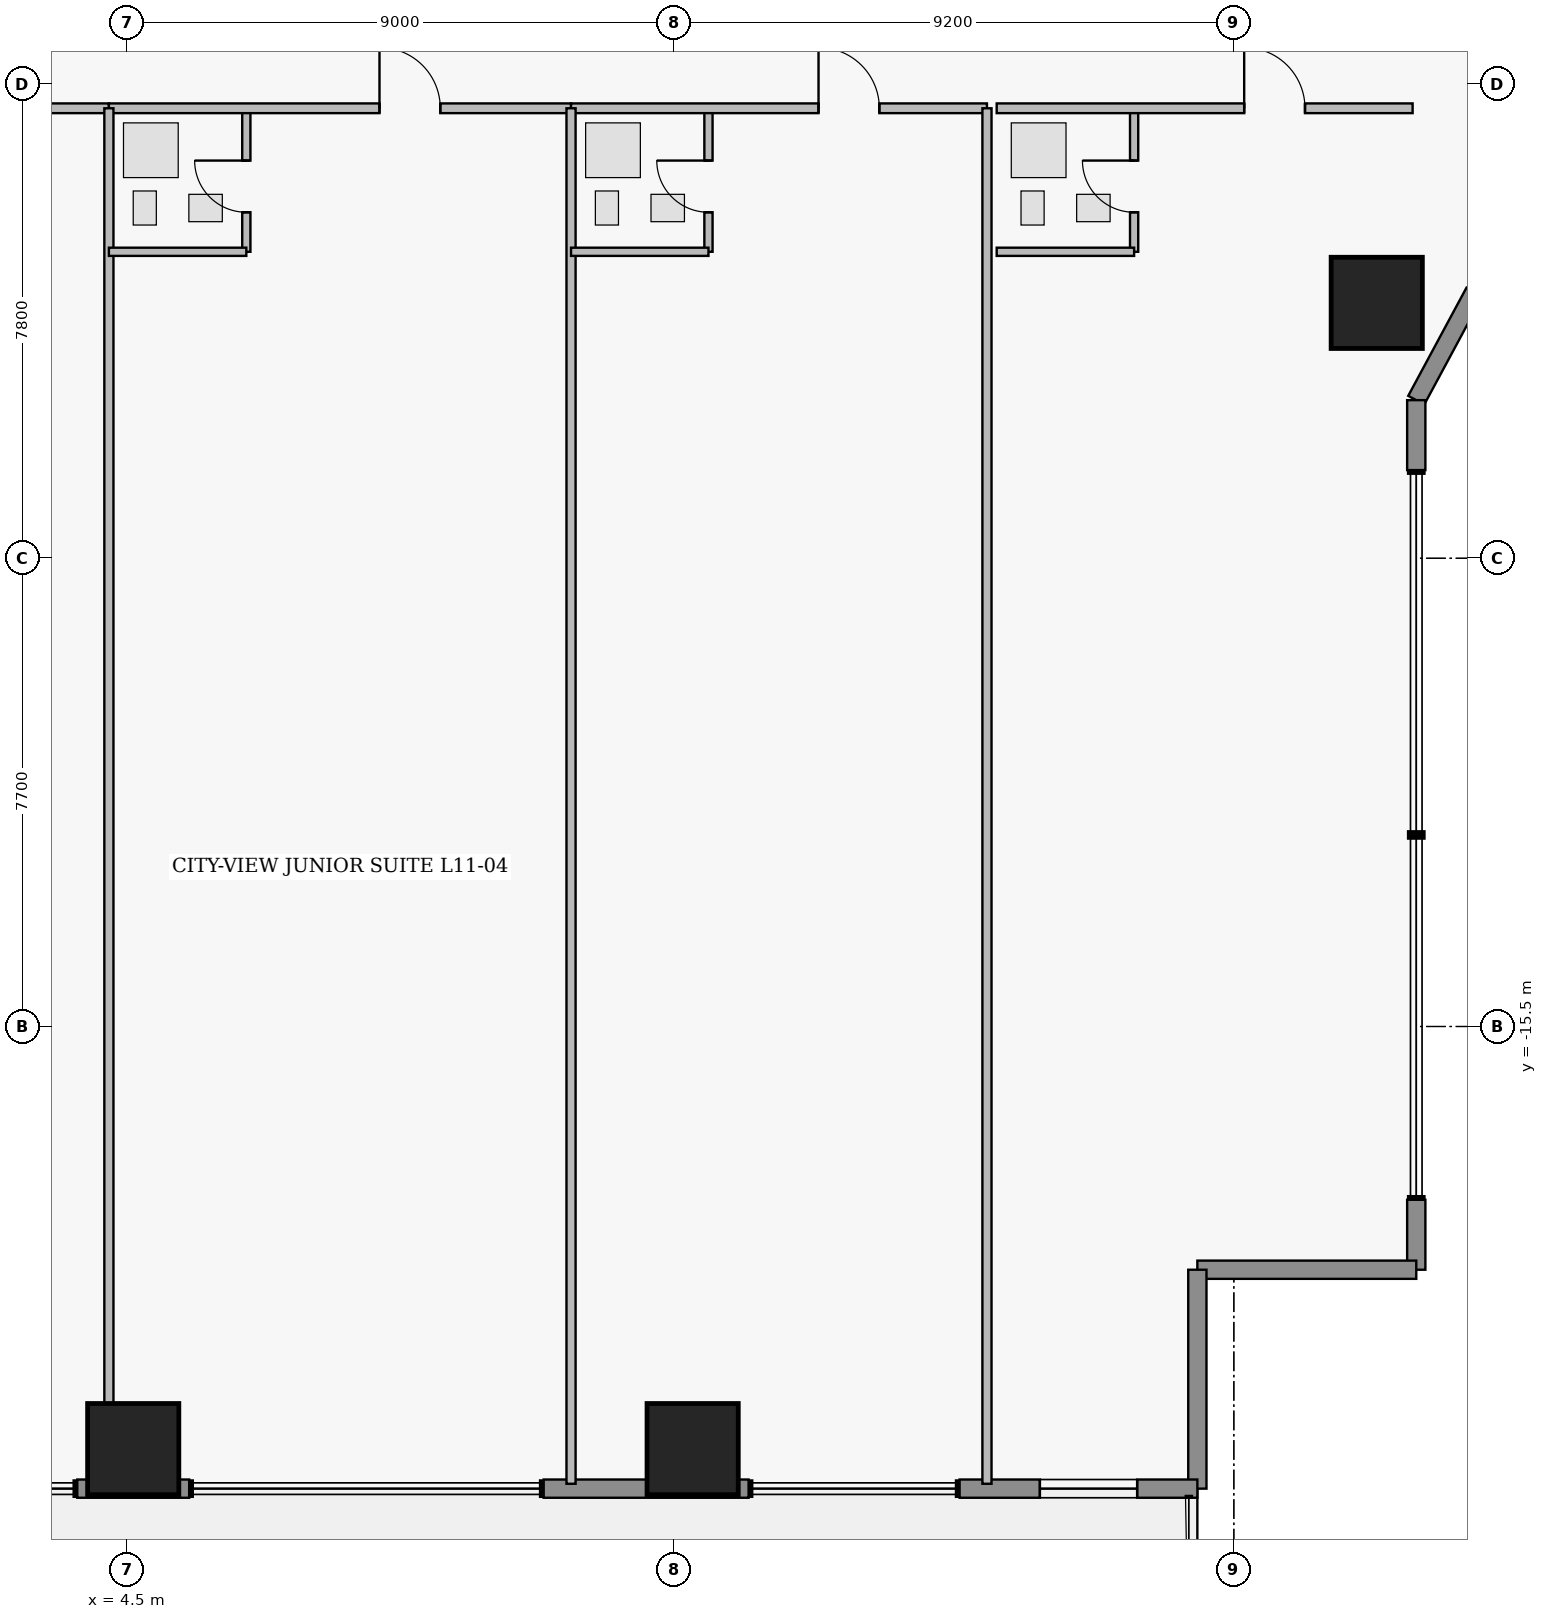
"""IFC4 building model, lengths in metres.
Left out: names, types, materials, properties, quantities, classifications, styles, units other than length and angle.
Written with IfcOpenShell. Run it as: python <this file> out.ifc"""

import sys

from ifc_helpers import new_model, si_unit, direction, frame, frame_2d, origin, origin_2d, place, context, subcontext, project, spatial, rectangle, extrude, element, fill, save


model = new_model("IFC4")
c1 = context("Model", 3, precision=1e-05, world=origin(), true_north=direction((0.0, 1.0)))
c2 = subcontext(c1, "Body", "Model", "MODEL_VIEW")
j1 = project(units=[si_unit("LENGTHUNIT", "METRE"), si_unit("PLANEANGLEUNIT", "RADIAN")], contexts=[c1])
p1 = place(None, origin())
s1 = spatial("IfcSite", under=j1, at=p1, CompositionType="ELEMENT")
p2 = place(p1, origin())
s2 = spatial("IfcBuilding", under=s1, at=p2, CompositionType="ELEMENT")
p3 = place(p2, frame((0.0, 0.0, 49.5)))
s3 = spatial("IfcBuildingStorey", under=s2, at=p3, CompositionType="ELEMENT", Elevation=49.5)
for number, where, z_axis, x_axis in (
    (1, (4.6, -22.45, 0.0), (0.0, 0.0, 1.0), (1.0, 0.0, 0.0)),
    (2, (13.8, -22.45, 0.0), (0.0, 0.0, 1.0), (1.0, 0.0, 0.0)),
    (3, (25.05, -3.6, 0.0), (0.0, 0.0, 1.0), (1.0, 0.0, 0.0)),
):
    element("IfcColumn", number, at=place(p3, frame(where, z_axis=z_axis, x_axis=x_axis)), inside=s3, PredefinedType="COLUMN", context=c2, shape_type="SweptSolid", body=[
        extrude(rectangle(XDim=1.5, YDim=1.5, at=origin_2d()), origin(), (0.0, 0.0, 1.0), 3.65),
    ])
p4 = place(p3, frame((25.7, 5.2, 0.0), z_axis=(0.0, 0.0, 1.0), x_axis=(0.474109683532, -0.880465790352, 0.0)))
e4 = element("IfcWall", 4, at=p4, inside=s3, PredefinedType="STANDARD", context=c2, shape_type="SweptSolid", body=[
    extrude(rectangle(XDim=5.906, YDim=0.3, at=frame_2d((2.953, 0.0))), origin(), (0.0, 0.0, 1.0), 3.43),
])
p5 = place(p4, frame((2.324, 0.0, 0.95)))
e5 = element("IfcOpeningElement", 5, at=p5, cuts=e4, PredefinedType="OPENING", context=c2, shape_type="SweptSolid", body=[
    extrude(rectangle(XDim=1.15, YDim=1.55, at=frame_2d((0.575, 0.775))), frame((0.0, 0.16, 0.0), z_axis=(0.0, -1.0, 0.0), x_axis=(1.0, 0.0, 0.0)), (0.0, 0.0, 1.0), 0.32),
])
p6 = place(p3, frame((26.658, -3.421, 0.0), z_axis=(0.0, 0.0, 1.0), x_axis=(-0.474121438562, -0.88045946045, 0.0)))
e6 = element("IfcWall", 6, at=p6, inside=s3, PredefinedType="STANDARD", context=c2, shape_type="SweptSolid", body=[
    extrude(rectangle(XDim=2.021, YDim=0.3, at=frame_2d((1.01, 0.0))), origin(), (0.0, 0.0, 1.0), 3.43),
])
p7 = place(p3, frame((25.7, -5.2, 0.0), z_axis=(0.0, 0.0, 1.0), x_axis=(0.0, -1.0, 0.0)))
e7 = element("IfcWall", 7, at=p7, inside=s3, PredefinedType="STANDARD", context=c2, shape_type="SweptSolid", body=[
    extrude(rectangle(XDim=1.15, YDim=0.3, at=frame_2d((0.575, 0.0))), origin(), (0.0, 0.0, 1.0), 3.43),
])
p8 = place(p3, frame((25.7, -18.35, 0.0), z_axis=(0.0, 0.0, 1.0), x_axis=(0.0, -1.0, 0.0)))
e8 = element("IfcWall", 8, at=p8, inside=s3, PredefinedType="STANDARD", context=c2, shape_type="SweptSolid", body=[
    extrude(rectangle(XDim=1.15, YDim=0.3, at=frame_2d((0.575, 0.0))), origin(), (0.0, 0.0, 1.0), 3.43),
])
p9 = place(p3, frame((25.7, -19.5, 0.0), z_axis=(0.0, 0.0, 1.0), x_axis=(-1.0, 0.0, 0.0)))
e9 = element("IfcWall", 9, at=p9, inside=s3, PredefinedType="STANDARD", context=c2, shape_type="SweptSolid", body=[
    extrude(rectangle(XDim=3.6, YDim=0.3, at=frame_2d((1.8, 0.0))), origin(), (0.0, 0.0, 1.0), 3.43),
])
p10 = place(p3, frame((22.1, -19.5, 0.0), z_axis=(0.0, 0.0, 1.0), x_axis=(0.0, -1.0, 0.0)))
e10 = element("IfcWall", 10, at=p10, inside=s3, PredefinedType="STANDARD", context=c2, shape_type="SweptSolid", body=[
    extrude(rectangle(XDim=3.6, YDim=0.3, at=frame_2d((1.8, 0.0))), origin(), (0.0, 0.0, 1.0), 3.43),
])
p11 = place(p3, frame((22.1, -23.1, 0.0), z_axis=(0.0, 0.0, 1.0), x_axis=(-1.0, 0.0, 0.0)))
e11 = element("IfcWall", 11, at=p11, inside=s3, PredefinedType="STANDARD", context=c2, shape_type="SweptSolid", body=[
    extrude(rectangle(XDim=3.91, YDim=0.3, at=frame_2d((1.955, 0.0))), origin(), (0.0, 0.0, 1.0), 3.43),
])
p12 = place(p11, frame((0.99, 0.0, 0.85)))
e12 = element("IfcOpeningElement", 12, at=p12, cuts=e11, PredefinedType="OPENING", context=c2, shape_type="SweptSolid", body=[
    extrude(rectangle(XDim=1.6, YDim=1.8, at=frame_2d((0.8, 0.9))), frame((0.0, 0.16, 0.0), z_axis=(0.0, -1.0, 0.0), x_axis=(1.0, 0.0, 0.0)), (0.0, 0.0, 1.0), 0.32),
])
p13 = place(p3, frame((14.72, -23.1, 0.0), z_axis=(0.0, 0.0, 1.0), x_axis=(-1.0, 0.0, 0.0)))
e13 = element("IfcWall", 13, at=p13, inside=s3, PredefinedType="STANDARD", context=c2, shape_type="SweptSolid", body=[
    extrude(rectangle(XDim=3.37, YDim=0.3, at=frame_2d((1.685, 0.0))), origin(), (0.0, 0.0, 1.0), 3.43),
])
p14 = place(p3, frame((5.52, -23.1, 0.0), z_axis=(0.0, 0.0, 1.0), x_axis=(-1.0, 0.0, 0.0)))
e14 = element("IfcWall", 14, at=p14, inside=s3, PredefinedType="STANDARD", context=c2, shape_type="SweptSolid", body=[
    extrude(rectangle(XDim=1.84, YDim=0.3, at=frame_2d((0.92, 0.0))), origin(), (0.0, 0.0, 1.0), 3.43),
])
p15 = place(p3, frame((-3.6, -0.4, 0.0), z_axis=(0.0, 0.0, 1.0), x_axis=(1.0, 0.0, 0.0)))
e15 = element("IfcWall", 15, at=p15, inside=s3, PredefinedType="PARTITIONING", context=c2, shape_type="SweptSolid", body=[
    extrude(rectangle(XDim=7.8, YDim=0.16, at=frame_2d((3.9, 0.0))), origin(), (0.0, 0.0, 1.0), 3.43),
])
p16 = place(p15, frame((4.55, 0.0, 0.0)))
e16 = element("IfcOpeningElement", 16, at=p16, cuts=e15, PredefinedType="OPENING", context=c2, shape_type="SweptSolid", body=[
    extrude(rectangle(XDim=1.0, YDim=2.15, at=frame_2d((0.5, 1.075))), frame((0.0, 0.09, 0.0), z_axis=(0.0, -1.0, 0.0), x_axis=(1.0, 0.0, 0.0)), (0.0, 0.0, 1.0), 0.18),
])
p17 = place(p3, frame((6.46, -2.76, 0.0), z_axis=(0.0, 0.0, 1.0), x_axis=(0.0, 1.0, 0.0)))
e17 = element("IfcWall", 17, at=p17, inside=s3, PredefinedType="PLUMBINGWALL", context=c2, shape_type="SweptSolid", body=[
    extrude(rectangle(XDim=2.36, YDim=0.135, at=frame_2d((1.18, 0.0))), origin(), (0.0, 0.0, 1.0), 3.43),
])
p18 = place(p17, frame((0.65, 0.0, 0.0)))
e18 = element("IfcOpeningElement", 18, at=p18, cuts=e17, PredefinedType="OPENING", context=c2, shape_type="SweptSolid", body=[
    extrude(rectangle(XDim=0.85, YDim=2.1, at=frame_2d((0.425, 1.05))), frame((0.0, 0.077, 0.0), z_axis=(0.0, -1.0, 0.0), x_axis=(1.0, 0.0, 0.0)), (0.0, 0.0, 1.0), 0.155),
])
p19 = place(p3, frame((4.2, -0.4, 0.0), z_axis=(0.0, 0.0, 1.0), x_axis=(1.0, 0.0, 0.0)))
e19 = element("IfcWall", 19, at=p19, inside=s3, PredefinedType="PARTITIONING", context=c2, shape_type="SweptSolid", body=[
    extrude(rectangle(XDim=7.6, YDim=0.16, at=frame_2d((3.8, 0.0))), origin(), (0.0, 0.0, 1.0), 3.43),
])
p20 = place(p19, frame((4.45, 0.0, 0.0)))
e20 = element("IfcOpeningElement", 20, at=p20, cuts=e19, PredefinedType="OPENING", context=c2, shape_type="SweptSolid", body=[
    extrude(rectangle(XDim=1.0, YDim=2.15, at=frame_2d((0.5, 1.075))), frame((0.0, 0.09, 0.0), z_axis=(0.0, -1.0, 0.0), x_axis=(1.0, 0.0, 0.0)), (0.0, 0.0, 1.0), 0.18),
])
p21 = place(p3, frame((14.06, -2.76, 0.0), z_axis=(0.0, 0.0, 1.0), x_axis=(0.0, 1.0, 0.0)))
e21 = element("IfcWall", 21, at=p21, inside=s3, PredefinedType="PLUMBINGWALL", context=c2, shape_type="SweptSolid", body=[
    extrude(rectangle(XDim=2.36, YDim=0.135, at=frame_2d((1.18, 0.0))), origin(), (0.0, 0.0, 1.0), 2.668),
])
p22 = place(p21, frame((0.65, 0.0, 0.0)))
e22 = element("IfcOpeningElement", 22, at=p22, cuts=e21, PredefinedType="OPENING", context=c2, shape_type="SweptSolid", body=[
    extrude(rectangle(XDim=0.85, YDim=2.1, at=frame_2d((0.425, 1.05))), frame((0.0, 0.077, 0.0), z_axis=(0.0, -1.0, 0.0), x_axis=(1.0, 0.0, 0.0)), (0.0, 0.0, 1.0), 0.155),
])
p23 = place(p3, frame((11.8, -0.4, 0.0), z_axis=(0.0, 0.0, 1.0), x_axis=(1.0, 0.0, 0.0)))
e23 = element("IfcWall", 23, at=p23, inside=s3, PredefinedType="PARTITIONING", context=c2, shape_type="SweptSolid", body=[
    extrude(rectangle(XDim=6.84, YDim=0.16, at=frame_2d((3.42, 0.0))), origin(), (0.0, 0.0, 1.0), 3.43),
])
p24 = place(p23, frame((4.07, 0.0, 0.0)))
e24 = element("IfcOpeningElement", 24, at=p24, cuts=e23, PredefinedType="OPENING", context=c2, shape_type="SweptSolid", body=[
    extrude(rectangle(XDim=1.0, YDim=2.15, at=frame_2d((0.5, 1.075))), frame((0.0, 0.09, 0.0), z_axis=(0.0, -1.0, 0.0), x_axis=(1.0, 0.0, 0.0)), (0.0, 0.0, 1.0), 0.18),
])
p25 = place(p3, frame((21.06, -2.76, 0.0), z_axis=(0.0, 0.0, 1.0), x_axis=(0.0, 1.0, 0.0)))
e25 = element("IfcWall", 25, at=p25, inside=s3, PredefinedType="PLUMBINGWALL", context=c2, shape_type="SweptSolid", body=[
    extrude(rectangle(XDim=2.36, YDim=0.135, at=frame_2d((1.18, 0.0))), origin(), (0.0, 0.0, 1.0), 3.43),
])
p26 = place(p25, frame((0.65, 0.0, 0.0)))
e26 = element("IfcOpeningElement", 26, at=p26, cuts=e25, PredefinedType="OPENING", context=c2, shape_type="SweptSolid", body=[
    extrude(rectangle(XDim=0.85, YDim=2.1, at=frame_2d((0.425, 1.05))), frame((0.0, 0.077, 0.0), z_axis=(0.0, -1.0, 0.0), x_axis=(1.0, 0.0, 0.0)), (0.0, 0.0, 1.0), 0.155),
])
p27 = place(p3, frame((18.8, -0.4, 0.0), z_axis=(0.0, 0.0, 1.0), x_axis=(1.0, 0.0, 0.0)))
e27 = element("IfcWall", 27, at=p27, inside=s3, PredefinedType="PARTITIONING", context=c2, shape_type="SweptSolid", body=[
    extrude(rectangle(XDim=6.84, YDim=0.16, at=frame_2d((3.42, 0.0))), origin(), (0.0, 0.0, 1.0), 3.43),
])
p28 = place(p27, frame((4.07, 0.0, 0.0)))
e28 = element("IfcOpeningElement", 28, at=p28, cuts=e27, PredefinedType="OPENING", context=c2, shape_type="SweptSolid", body=[
    extrude(rectangle(XDim=1.0, YDim=2.15, at=frame_2d((0.5, 1.075))), frame((0.0, 0.09, 0.0), z_axis=(0.0, -1.0, 0.0), x_axis=(1.0, 0.0, 0.0)), (0.0, 0.0, 1.0), 0.18),
])
p29 = place(p3, frame((4.2, -23.02, 0.0), z_axis=(0.0, 0.0, 1.0), x_axis=(0.0, 1.0, 0.0)))
e29 = element("IfcWall", 29, at=p29, inside=s3, PredefinedType="PARTITIONING", context=c2, shape_type="SweptSolid", body=[
    extrude(rectangle(XDim=22.62, YDim=0.15, at=frame_2d((11.31, 0.0))), origin(), (0.0, 0.0, 1.0), 2.668),
])
p30 = place(p3, frame((4.2, -2.76, 0.0), z_axis=(0.0, 0.0, 1.0), x_axis=(1.0, 0.0, 0.0)))
e30 = element("IfcWall", 30, at=p30, inside=s3, PredefinedType="PLUMBINGWALL", context=c2, shape_type="SweptSolid", body=[
    extrude(rectangle(XDim=2.26, YDim=0.135, at=frame_2d((1.13, 0.0))), origin(), (0.0, 0.0, 1.0), 3.43),
])
p31 = place(p3, frame((11.8, -23.02, 0.0), z_axis=(0.0, 0.0, 1.0), x_axis=(0.0, 1.0, 0.0)))
e31 = element("IfcWall", 31, at=p31, inside=s3, PredefinedType="PARTITIONING", context=c2, shape_type="SweptSolid", body=[
    extrude(rectangle(XDim=22.62, YDim=0.15, at=frame_2d((11.31, 0.0))), origin(), (0.0, 0.0, 1.0), 3.43),
])
p32 = place(p3, frame((11.8, -2.76, 0.0), z_axis=(0.0, 0.0, 1.0), x_axis=(1.0, 0.0, 0.0)))
e32 = element("IfcWall", 32, at=p32, inside=s3, PredefinedType="PLUMBINGWALL", context=c2, shape_type="SweptSolid", body=[
    extrude(rectangle(XDim=2.26, YDim=0.135, at=frame_2d((1.13, 0.0))), origin(), (0.0, 0.0, 1.0), 3.43),
])
p33 = place(p3, frame((18.64, -23.02, 0.0), z_axis=(0.0, 0.0, 1.0), x_axis=(0.0, 1.0, 0.0)))
e33 = element("IfcWall", 33, at=p33, inside=s3, PredefinedType="PARTITIONING", context=c2, shape_type="SweptSolid", body=[
    extrude(rectangle(XDim=22.62, YDim=0.15, at=frame_2d((11.31, 0.0))), origin(), (0.0, 0.0, 1.0), 3.43),
])
p34 = place(p3, frame((18.8, -2.76, 0.0), z_axis=(0.0, 0.0, 1.0), x_axis=(1.0, 0.0, 0.0)))
e34 = element("IfcWall", 34, at=p34, inside=s3, PredefinedType="PLUMBINGWALL", context=c2, shape_type="SweptSolid", body=[
    extrude(rectangle(XDim=2.26, YDim=0.135, at=frame_2d((1.13, 0.0))), origin(), (0.0, 0.0, 1.0), 3.43),
])
p35 = place(p12, origin())
e35 = element("IfcWindow", 35, at=p35, inside=s3, PartitioningType="SINGLE_PANEL", PredefinedType="WINDOW", context=c2, shape_type="SweptSolid", body=[
    extrude(rectangle(XDim=1.6, YDim=1.8, at=frame_2d((0.8, 0.9))), frame((0.0, 0.03, 0.0), z_axis=(0.0, -1.0, 0.0), x_axis=(1.0, 0.0, 0.0)), (0.0, 0.0, 1.0), 0.06),
])
fill(e12, e35)
p36 = place(p18, origin())
e36 = element("IfcDoor", 36, at=p36, inside=s3, OperationType="SINGLE_SWING_RIGHT", PredefinedType="DOOR", context=c2, shape_type="SweptSolid", body=[
    extrude(rectangle(XDim=0.85, YDim=2.1, at=frame_2d((0.425, 1.05))), frame((0.0, 0.025, 0.0), z_axis=(0.0, -1.0, 0.0), x_axis=(1.0, 0.0, 0.0)), (0.0, 0.0, 1.0), 0.05),
])
fill(e18, e36)
p37 = place(p20, origin())
e37 = element("IfcDoor", 37, at=p37, inside=s3, OperationType="SINGLE_SWING_LEFT", PredefinedType="DOOR", context=c2, shape_type="SweptSolid", body=[
    extrude(rectangle(XDim=1.0, YDim=2.15, at=frame_2d((0.5, 1.075))), frame((0.0, 0.025, 0.0), z_axis=(0.0, -1.0, 0.0), x_axis=(1.0, 0.0, 0.0)), (0.0, 0.0, 1.0), 0.05),
])
fill(e20, e37)
p38 = place(p22, origin())
e38 = element("IfcDoor", 38, at=p38, inside=s3, OperationType="SINGLE_SWING_RIGHT", PredefinedType="DOOR", context=c2, shape_type="SweptSolid", body=[
    extrude(rectangle(XDim=0.85, YDim=2.1, at=frame_2d((0.425, 1.05))), frame((0.0, 0.025, 0.0), z_axis=(0.0, -1.0, 0.0), x_axis=(1.0, 0.0, 0.0)), (0.0, 0.0, 1.0), 0.05),
])
fill(e22, e38)
p39 = place(p24, origin())
e39 = element("IfcDoor", 39, at=p39, inside=s3, OperationType="SINGLE_SWING_LEFT", PredefinedType="DOOR", context=c2, shape_type="SweptSolid", body=[
    extrude(rectangle(XDim=1.0, YDim=2.15, at=frame_2d((0.5, 1.075))), frame((0.0, 0.025, 0.0), z_axis=(0.0, -1.0, 0.0), x_axis=(1.0, 0.0, 0.0)), (0.0, 0.0, 1.0), 0.05),
])
fill(e24, e39)
p40 = place(p26, origin())
e40 = element("IfcDoor", 40, at=p40, inside=s3, OperationType="SINGLE_SWING_RIGHT", PredefinedType="DOOR", context=c2, shape_type="SweptSolid", body=[
    extrude(rectangle(XDim=0.85, YDim=2.1, at=frame_2d((0.425, 1.05))), frame((0.0, 0.025, 0.0), z_axis=(0.0, -1.0, 0.0), x_axis=(1.0, 0.0, 0.0)), (0.0, 0.0, 1.0), 0.05),
])
fill(e26, e40)
p41 = place(p28, origin())
e41 = element("IfcDoor", 41, at=p41, inside=s3, OperationType="SINGLE_SWING_LEFT", PredefinedType="DOOR", context=c2, shape_type="SweptSolid", body=[
    extrude(rectangle(XDim=1.0, YDim=2.15, at=frame_2d((0.5, 1.075))), frame((0.0, 0.025, 0.0), z_axis=(0.0, -1.0, 0.0), x_axis=(1.0, 0.0, 0.0)), (0.0, 0.0, 1.0), 0.05),
])
fill(e28, e41)
save(model, sys.argv[1])
